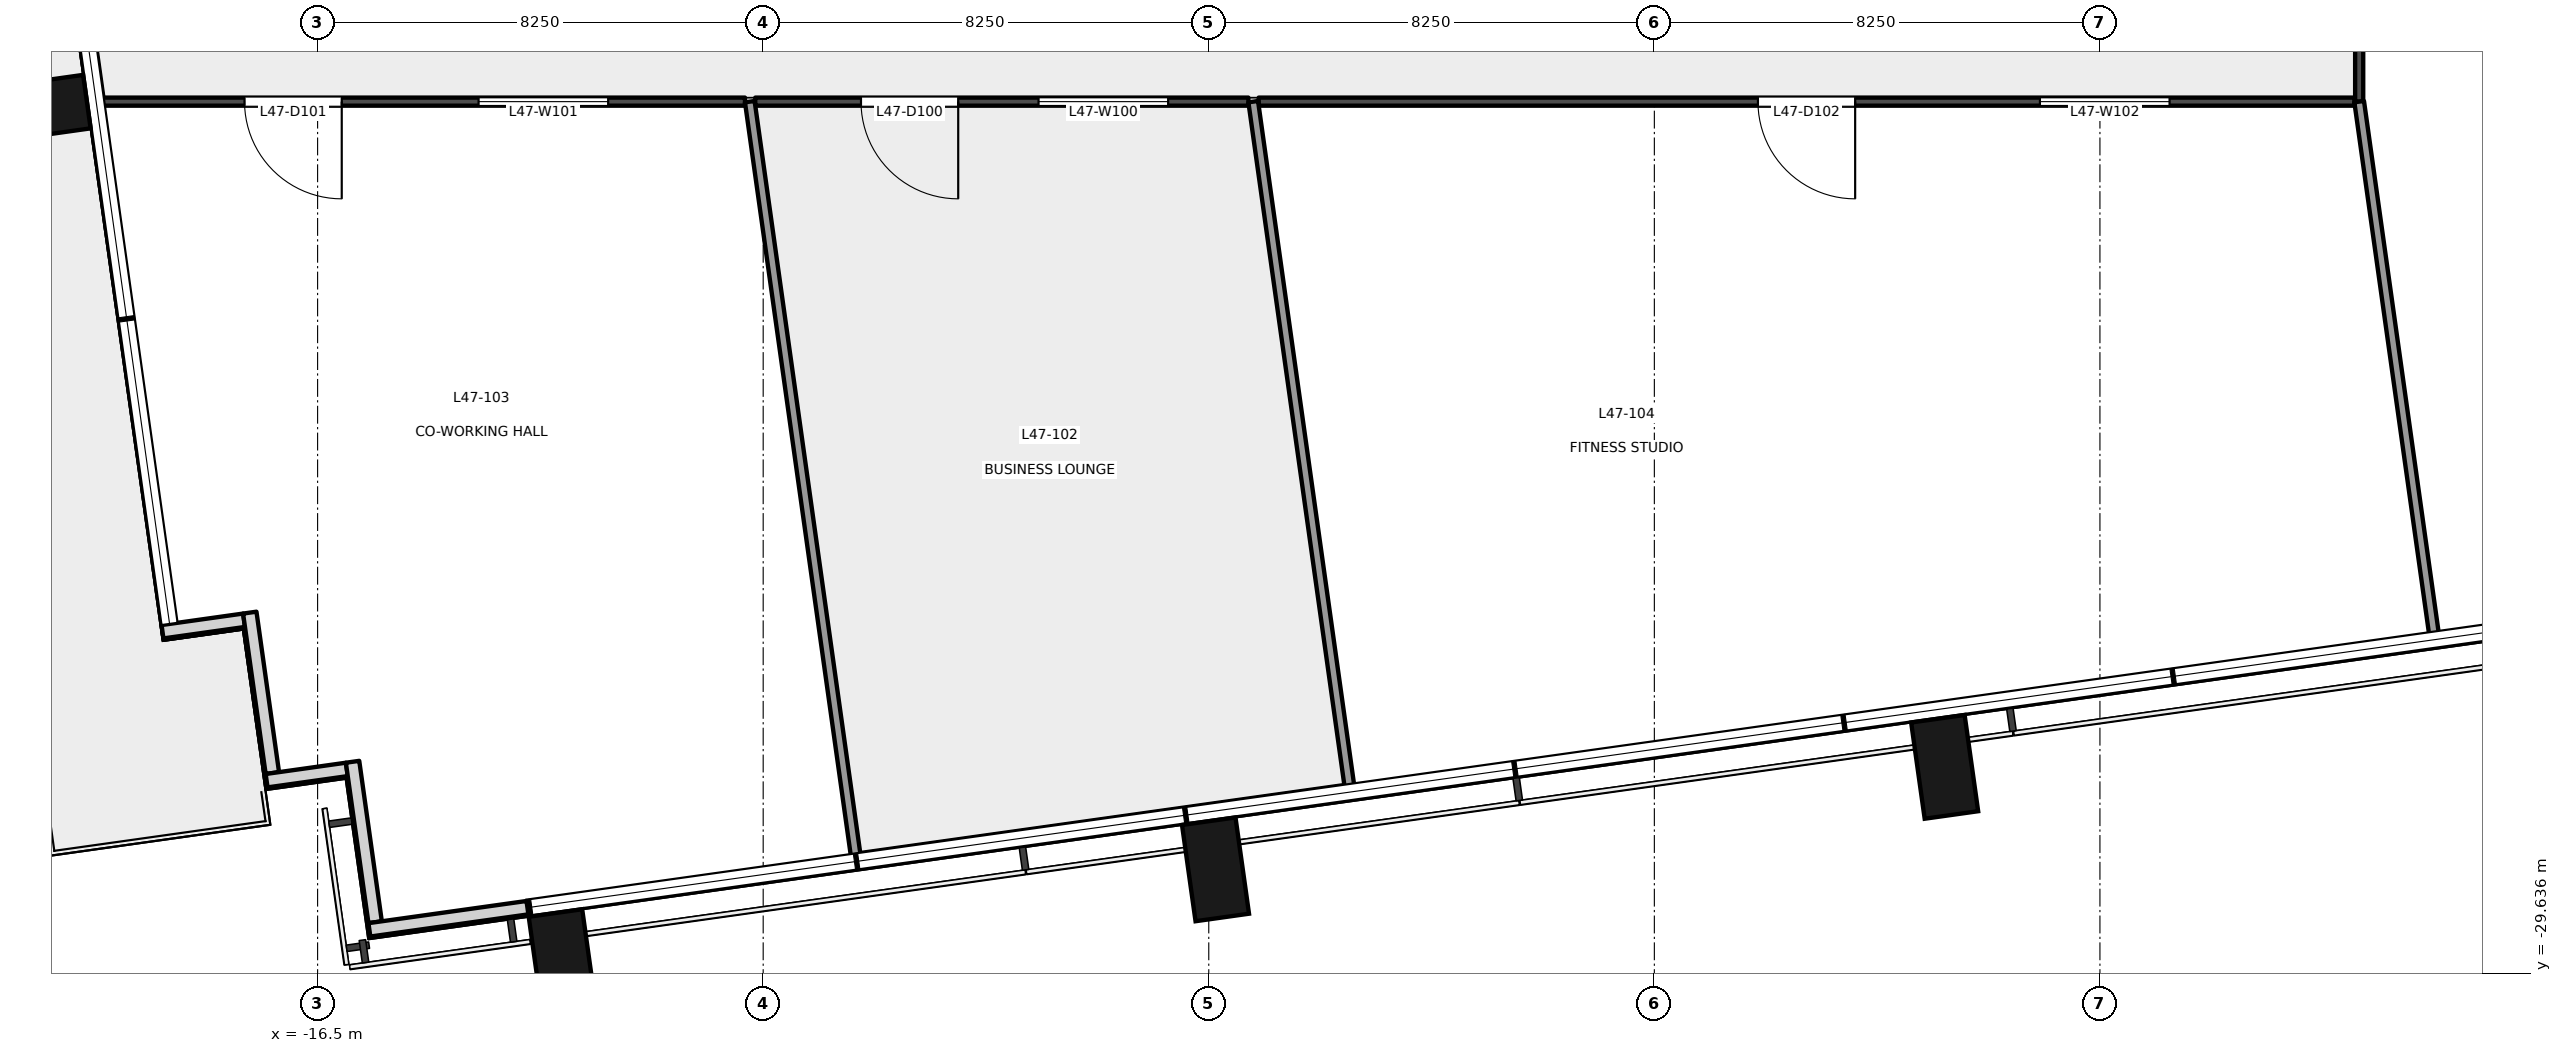
"""IFC4 building model, lengths in metres.
Left out: names, types, materials, properties, quantities, classifications, styles, units other than length and angle.
Written with IfcOpenShell. Run it as: python <this file> out.ifc"""

import sys

from ifc_helpers import new_model, si_unit, direction, frame, frame_2d, origin, origin_2d, place, context, subcontext, project, spatial, rectangle, extrude, element, fill, save


model = new_model("IFC4")
c1 = context("Model", 3, precision=1e-05, world=origin(), true_north=direction((0.0, 1.0)))
c2 = subcontext(c1, "Body", "Model", "MODEL_VIEW")
j1 = project(units=[si_unit("LENGTHUNIT", "METRE"), si_unit("PLANEANGLEUNIT", "RADIAN")], contexts=[c1])
p1 = place(None, origin())
s1 = spatial("IfcSite", under=j1, at=p1, CompositionType="ELEMENT")
p2 = place(p1, origin())
s2 = spatial("IfcBuilding", under=s1, at=p2, CompositionType="ELEMENT")
p3 = place(p2, frame((0.0, 0.0, 208.1)))
s3 = spatial("IfcBuildingStorey", under=s2, at=p3, CompositionType="ELEMENT", Elevation=208.1)
for number, where, z_axis, x_axis in (
    (1, (-11.971, -29.416, -0.2), (0.0, 0.0, 1.0), (0.99, 0.139, 0.0)),
    (2, (0.125, -27.716, -0.2), (0.0, 0.0, 1.0), (0.99, 0.139, 0.0)),
    (3, (13.625, -25.818, -0.2), (0.0, 0.0, 1.0), (0.99, 0.139, 0.0)),
    (4, (-21.663, -13.625, -0.2), (0.0, 0.0, 1.0), (-0.139, 0.99, 0.0)),
):
    element("IfcColumn", number, at=place(p3, frame(where, z_axis=z_axis, x_axis=x_axis)), inside=s3, PredefinedType="COLUMN", context=c2, shape_type="SweptSolid", body=[
        extrude(rectangle(XDim=1.0, YDim=1.8, at=origin_2d()), origin(), (0.0, 0.0, 1.0), 5.4),
    ])
p4 = place(p3, frame((-19.372, -23.316, 0.0), z_axis=(0.0, 0.0, 1.0), x_axis=(0.990226193633, 0.139470733288, 0.0)))
e5 = element("IfcWall", 5, at=p4, inside=s3, PredefinedType="SOLIDWALL", context=c2, shape_type="SweptSolid", body=[
    extrude(rectangle(XDim=1.525, YDim=0.25, at=frame_2d((0.762, 0.0))), origin(), (0.0, 0.0, 1.0), 5.2),
])
p5 = place(p3, frame((-17.756, -22.962, 0.0), z_axis=(0.0, 0.0, 1.0), x_axis=(0.139393225799, -0.990237107263, 0.0)))
e6 = element("IfcWall", 6, at=p5, inside=s3, PredefinedType="SOLIDWALL", context=c2, shape_type="SweptSolid", body=[
    extrude(rectangle(XDim=3.0, YDim=0.25, at=frame_2d((1.5, 0.0))), origin(), (0.0, 0.0, 1.0), 5.2),
])
p6 = place(p3, frame((-17.444, -26.074, 0.0), z_axis=(0.0, 0.0, 1.0), x_axis=(0.990240434918, 0.139369584395, 0.0)))
e7 = element("IfcWall", 7, at=p6, inside=s3, PredefinedType="SOLIDWALL", context=c2, shape_type="SweptSolid", body=[
    extrude(rectangle(XDim=1.5, YDim=0.25, at=frame_2d((0.75, 0.0))), origin(), (0.0, 0.0, 1.0), 5.2),
])
p7 = place(p3, frame((-15.853, -25.724, 0.0), z_axis=(0.0, 0.0, 1.0), x_axis=(0.139302206688, -0.990249915532, 0.0)))
e8 = element("IfcWall", 8, at=p7, inside=s3, PredefinedType="SOLIDWALL", context=c2, shape_type="SweptSolid", body=[
    extrude(rectangle(XDim=3.0, YDim=0.25, at=frame_2d((1.5, 0.0))), origin(), (0.0, 0.0, 1.0), 5.2),
])
p8 = place(p3, frame((-15.541, -28.836, 0.0), z_axis=(0.0, 0.0, 1.0), x_axis=(0.990285396533, 0.139049751574, 0.0)))
e9 = element("IfcWall", 9, at=p8, inside=s3, PredefinedType="SOLIDWALL", context=c2, shape_type="SweptSolid", body=[
    extrude(rectangle(XDim=2.955, YDim=0.25, at=frame_2d((1.478, 0.0))), origin(), (0.0, 0.0, 1.0), 5.2),
])
p9 = place(p3, frame((0.734, -13.5, 0.0), z_axis=(0.0, 0.0, 1.0), x_axis=(-1.0, 0.0, 0.0)))
e10 = element("IfcWall", 10, at=p9, inside=s3, PredefinedType="PARTITIONING", context=c2, shape_type="SweptSolid", body=[
    extrude(rectangle(XDim=9.131, YDim=0.15, at=frame_2d((4.565, 0.0))), origin(), (0.0, 0.0, 1.0), 4.3),
])
p10 = place(p9, frame((5.373, 0.0, 0.0)))
e11 = element("IfcOpeningElement", 11, at=p10, cuts=e10, PredefinedType="OPENING", context=c2, shape_type="SweptSolid", body=[
    extrude(rectangle(XDim=1.8, YDim=2.1, at=frame_2d((0.9, 1.05))), frame((0.0, 0.085, 0.0), z_axis=(0.0, -1.0, 0.0), x_axis=(1.0, 0.0, 0.0)), (0.0, 0.0, 1.0), 0.171),
])
p11 = place(p9, frame((1.486, 0.0, 0.0)))
e12 = element("IfcOpeningElement", 12, at=p11, cuts=e10, PredefinedType="OPENING", context=c2, shape_type="SweptSolid", body=[
    extrude(rectangle(XDim=2.4, YDim=2.4, at=frame_2d((1.2, 1.2))), frame((0.0, 0.085, 0.0), z_axis=(0.0, -1.0, 0.0), x_axis=(1.0, 0.0, 0.0)), (0.0, 0.0, 1.0), 0.171),
])
p12 = place(p3, frame((-8.587, -13.5, 0.0), z_axis=(0.0, 0.0, 1.0), x_axis=(-1.0, 0.0, 0.0)))
e13 = element("IfcWall", 13, at=p12, inside=s3, PredefinedType="PARTITIONING", context=c2, shape_type="SweptSolid", body=[
    extrude(rectangle(XDim=11.922, YDim=0.15, at=frame_2d((5.961, 0.0))), origin(), (0.0, 0.0, 1.0), 4.3),
])
p13 = place(p12, frame((7.466, 0.0, 0.0)))
e14 = element("IfcOpeningElement", 14, at=p13, cuts=e13, PredefinedType="OPENING", context=c2, shape_type="SweptSolid", body=[
    extrude(rectangle(XDim=1.8, YDim=2.1, at=frame_2d((0.9, 1.05))), frame((0.0, 0.085, 0.0), z_axis=(0.0, -1.0, 0.0), x_axis=(1.0, 0.0, 0.0)), (0.0, 0.0, 1.0), 0.171),
])
p14 = place(p12, frame((2.533, 0.0, 0.0)))
e15 = element("IfcOpeningElement", 15, at=p14, cuts=e13, PredefinedType="OPENING", context=c2, shape_type="SweptSolid", body=[
    extrude(rectangle(XDim=2.4, YDim=2.4, at=frame_2d((1.2, 1.2))), frame((0.0, 0.085, 0.0), z_axis=(0.0, -1.0, 0.0), x_axis=(1.0, 0.0, 0.0)), (0.0, 0.0, 1.0), 0.171),
])
p15 = place(p3, frame((21.211, -13.5, 0.0), z_axis=(0.0, 0.0, 1.0), x_axis=(-1.0, 0.0, 0.0)))
e16 = element("IfcWall", 16, at=p15, inside=s3, PredefinedType="PARTITIONING", context=c2, shape_type="SweptSolid", body=[
    extrude(rectangle(XDim=20.287, YDim=0.15, at=frame_2d((10.144, 0.0))), origin(), (0.0, 0.0, 1.0), 4.3),
])
p16 = place(p15, frame((9.243, 0.0, 0.0)))
e17 = element("IfcOpeningElement", 17, at=p16, cuts=e16, PredefinedType="OPENING", context=c2, shape_type="SweptSolid", body=[
    extrude(rectangle(XDim=1.8, YDim=2.1, at=frame_2d((0.9, 1.05))), frame((0.0, 0.085, 0.0), z_axis=(0.0, -1.0, 0.0), x_axis=(1.0, 0.0, 0.0)), (0.0, 0.0, 1.0), 0.171),
])
p17 = place(p15, frame((3.422, 0.0, 0.0)))
e18 = element("IfcOpeningElement", 18, at=p17, cuts=e16, PredefinedType="OPENING", context=c2, shape_type="SweptSolid", body=[
    extrude(rectangle(XDim=2.4, YDim=2.4, at=frame_2d((1.2, 1.2))), frame((0.0, 0.085, 0.0), z_axis=(0.0, -1.0, 0.0), x_axis=(1.0, 0.0, 0.0)), (0.0, 0.0, 1.0), 0.171),
])
p18 = place(p3, frame((21.3, -8.772, 0.0), z_axis=(0.0, 0.0, 1.0), x_axis=(0.0, -1.0, 0.0)))
e19 = element("IfcWall", 19, at=p18, inside=s3, PredefinedType="PARTITIONING", context=c2, shape_type="SweptSolid", body=[
    extrude(rectangle(XDim=4.728, YDim=0.15, at=frame_2d((2.364, 0.0))), origin(), (0.0, 0.0, 1.0), 5.2),
])
p19 = place(p18, frame((0.857, 0.0, 0.0)))
e20 = element("IfcOpeningElement", 20, at=p19, cuts=e19, PredefinedType="OPENING", context=c2, shape_type="SweptSolid", body=[
    extrude(rectangle(XDim=1.8, YDim=2.1, at=frame_2d((0.9, 1.05))), frame((0.0, 0.085, 0.0), z_axis=(0.0, -1.0, 0.0), x_axis=(1.0, 0.0, 0.0)), (0.0, 0.0, 1.0), 0.171),
])
p20 = place(p3, frame((-6.534, -27.481, 0.0), z_axis=(0.0, 0.0, 1.0), x_axis=(-0.139118642378, 0.990275720869, 0.0)))
e21 = element("IfcWall", 21, at=p20, inside=s3, PredefinedType="PARTITIONING", context=c2, shape_type="SweptSolid", body=[
    extrude(rectangle(XDim=14.118, YDim=0.18, at=frame_2d((7.059, 0.0))), origin(), (0.0, 0.0, 1.0), 5.2),
])
p21 = place(p3, frame((0.823, -13.5, 0.0), z_axis=(0.0, 0.0, 1.0), x_axis=(0.139144249442, -0.990272123129, 0.0)))
e22 = element("IfcWall", 22, at=p21, inside=s3, PredefinedType="PARTITIONING", context=c2, shape_type="SweptSolid", body=[
    extrude(rectangle(XDim=12.821, YDim=0.18, at=frame_2d((6.41, 0.0))), origin(), (0.0, 0.0, 1.0), 5.2),
])
p22 = place(p3, frame((21.3, -13.5, 0.0), z_axis=(0.0, 0.0, 1.0), x_axis=(0.139100263023, -0.990278302714, 0.0)))
e23 = element("IfcWall", 23, at=p22, inside=s3, PredefinedType="PARTITIONING", context=c2, shape_type="SweptSolid", body=[
    extrude(rectangle(XDim=9.971, YDim=0.18, at=frame_2d((4.985, 0.0))), origin(), (0.0, 0.0, 1.0), 5.2),
])
p23 = place(p10, origin())
e24 = element("IfcDoor", 24, at=p23, inside=s3, OperationType="DOUBLE_DOOR_SINGLE_SWING", PredefinedType="DOOR", context=c2, shape_type="SweptSolid", body=[
    extrude(rectangle(XDim=1.8, YDim=2.1, at=frame_2d((0.9, 1.05))), frame((0.0, 0.025, 0.0), z_axis=(0.0, -1.0, 0.0), x_axis=(1.0, 0.0, 0.0)), (0.0, 0.0, 1.0), 0.05),
])
fill(e11, e24)
p24 = place(p13, origin())
e25 = element("IfcDoor", 25, at=p24, inside=s3, OperationType="DOUBLE_DOOR_SINGLE_SWING", PredefinedType="DOOR", context=c2, shape_type="SweptSolid", body=[
    extrude(rectangle(XDim=1.8, YDim=2.1, at=frame_2d((0.9, 1.05))), frame((0.0, 0.025, 0.0), z_axis=(0.0, -1.0, 0.0), x_axis=(1.0, 0.0, 0.0)), (0.0, 0.0, 1.0), 0.05),
])
fill(e14, e25)
p25 = place(p16, origin())
e26 = element("IfcDoor", 26, at=p25, inside=s3, OperationType="DOUBLE_DOOR_SINGLE_SWING", PredefinedType="DOOR", context=c2, shape_type="SweptSolid", body=[
    extrude(rectangle(XDim=1.8, YDim=2.1, at=frame_2d((0.9, 1.05))), frame((0.0, 0.025, 0.0), z_axis=(0.0, -1.0, 0.0), x_axis=(1.0, 0.0, 0.0)), (0.0, 0.0, 1.0), 0.05),
])
fill(e17, e26)
p26 = place(p11, origin())
e27 = element("IfcWindow", 27, at=p26, inside=s3, PartitioningType="SINGLE_PANEL", PredefinedType="WINDOW", context=c2, shape_type="SweptSolid", body=[
    extrude(rectangle(XDim=2.4, YDim=2.4, at=frame_2d((1.2, 1.2))), frame((0.0, 0.03, 0.0), z_axis=(0.0, -1.0, 0.0), x_axis=(1.0, 0.0, 0.0)), (0.0, 0.0, 1.0), 0.06),
])
fill(e12, e27)
p27 = place(p14, origin())
e28 = element("IfcWindow", 28, at=p27, inside=s3, PartitioningType="SINGLE_PANEL", PredefinedType="WINDOW", context=c2, shape_type="SweptSolid", body=[
    extrude(rectangle(XDim=2.4, YDim=2.4, at=frame_2d((1.2, 1.2))), frame((0.0, 0.03, 0.0), z_axis=(0.0, -1.0, 0.0), x_axis=(1.0, 0.0, 0.0)), (0.0, 0.0, 1.0), 0.06),
])
fill(e15, e28)
p28 = place(p17, origin())
e29 = element("IfcWindow", 29, at=p28, inside=s3, PartitioningType="SINGLE_PANEL", PredefinedType="WINDOW", context=c2, shape_type="SweptSolid", body=[
    extrude(rectangle(XDim=2.4, YDim=2.4, at=frame_2d((1.2, 1.2))), frame((0.0, 0.03, 0.0), z_axis=(0.0, -1.0, 0.0), x_axis=(1.0, 0.0, 0.0)), (0.0, 0.0, 1.0), 0.06),
])
fill(e18, e29)
save(model, sys.argv[1])
